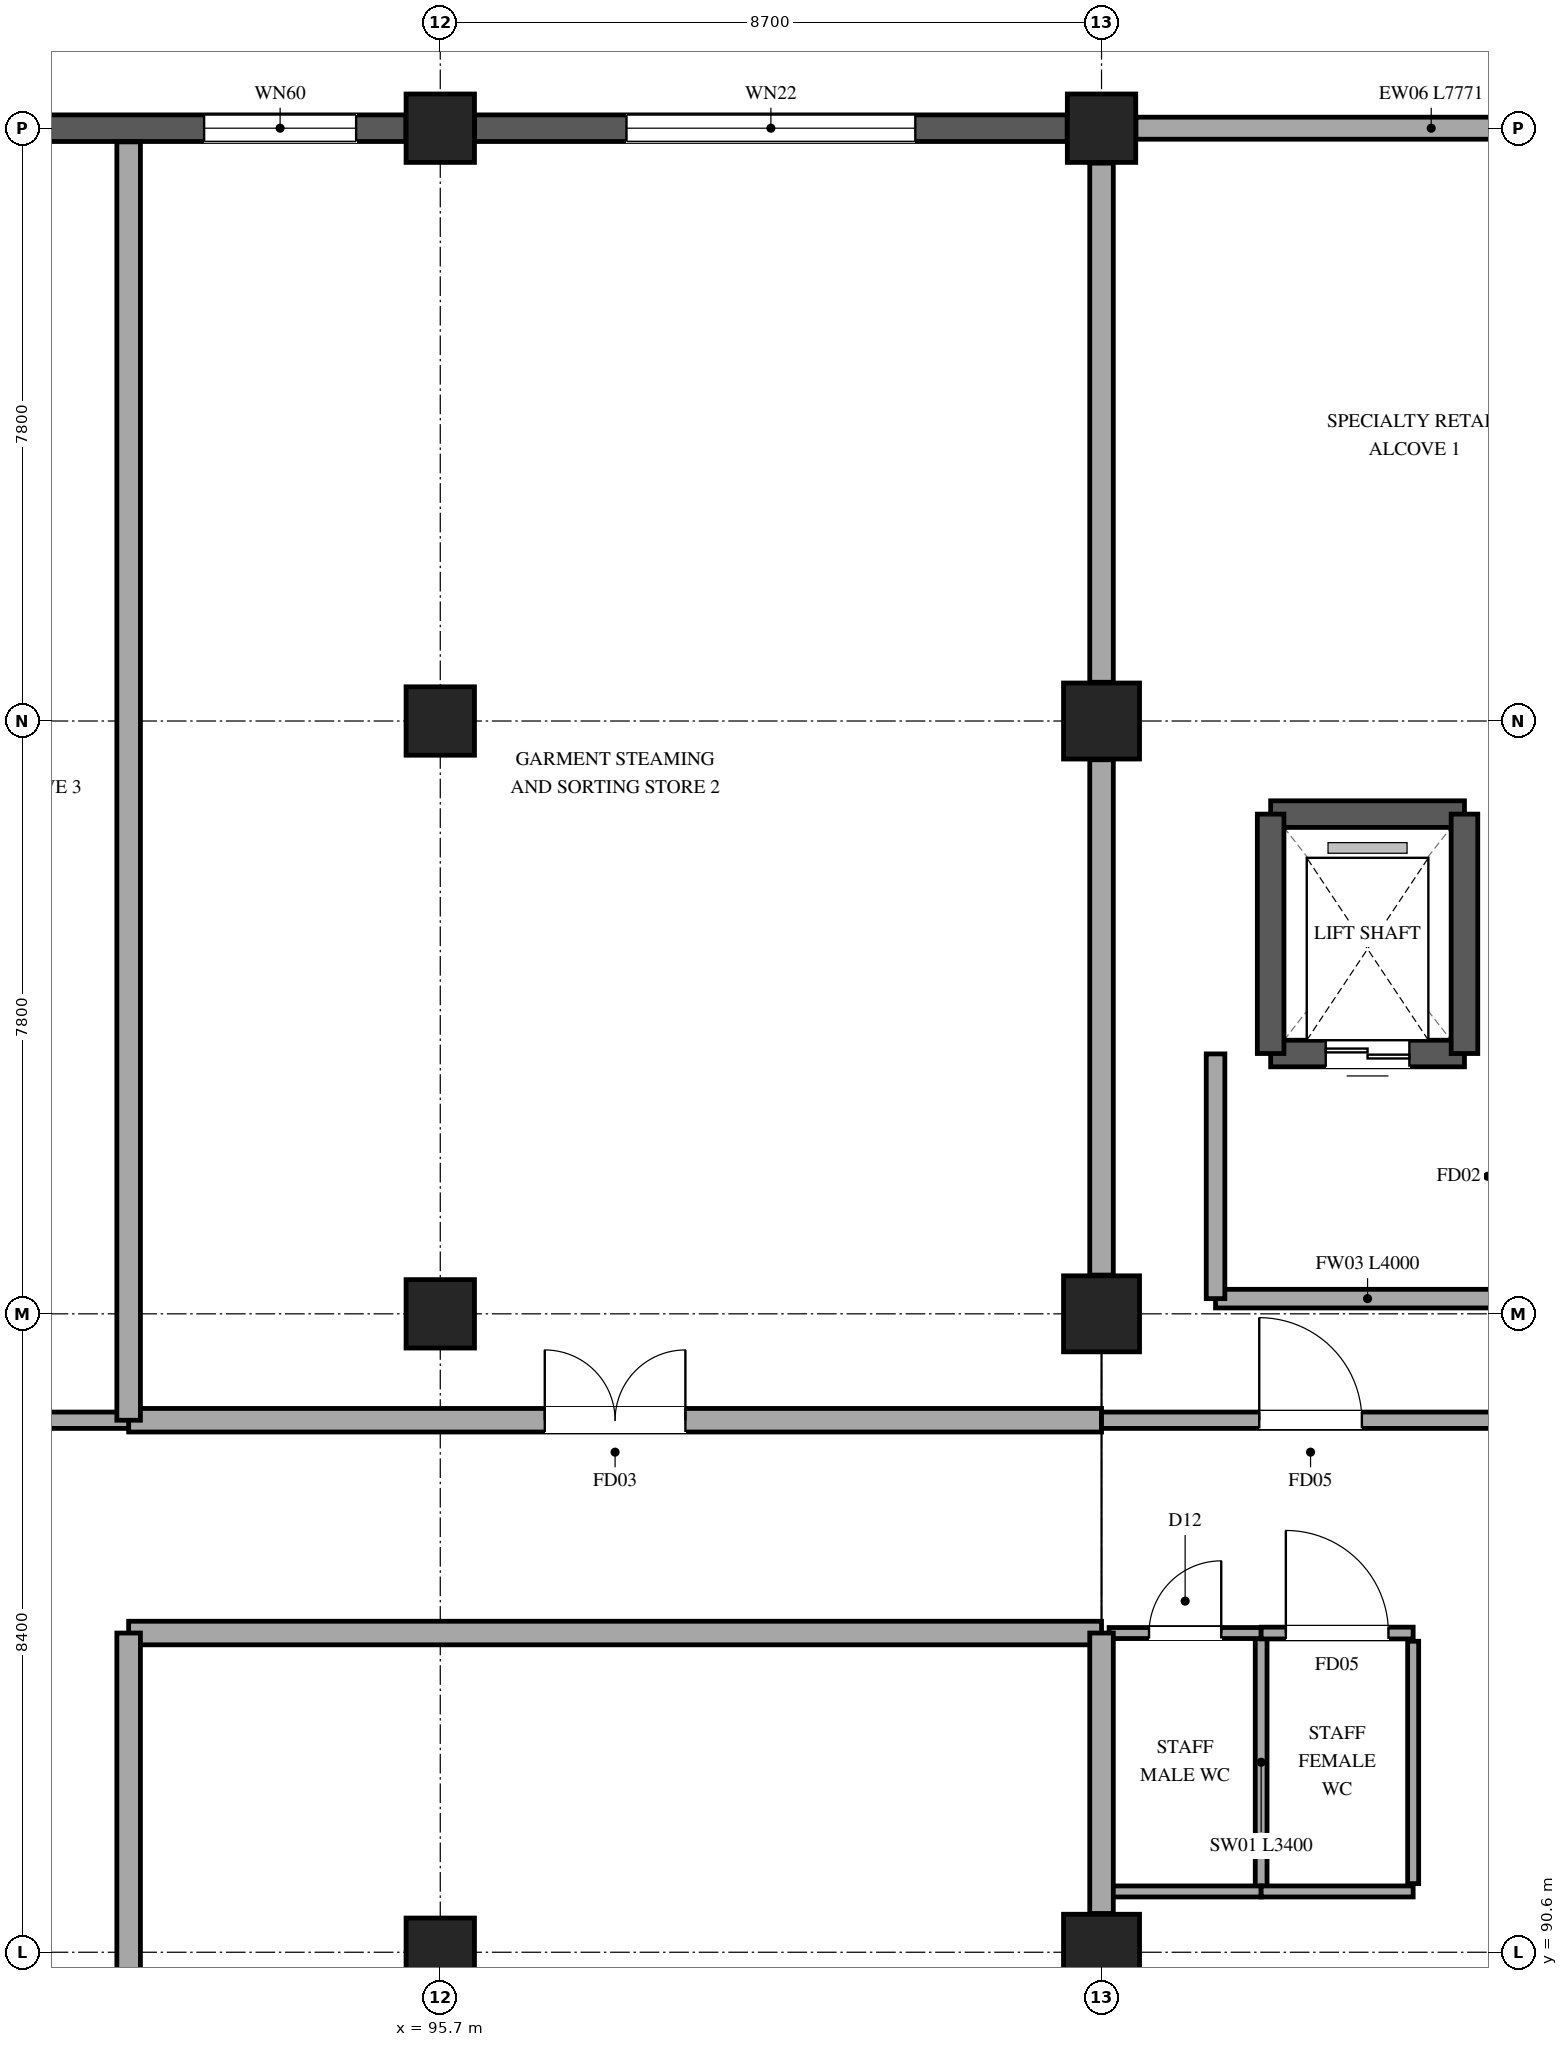
"""IFC4 building model, lengths in metres.
Left out: names, types, materials, properties, quantities, classifications, styles, units other than length and angle.
Written with IfcOpenShell. Run it as: python <this file> out.ifc"""

import sys

from ifc_helpers import new_model, si_unit, direction, frame, frame_2d, origin, origin_2d, place, context, subcontext, project, spatial, rectangle, extrude, element, fill, save


model = new_model("IFC4")
c1 = context("Model", 3, precision=1e-05, world=origin(), true_north=direction((0.0, 1.0)))
c2 = subcontext(c1, "Body", "Model", "MODEL_VIEW")
j1 = project(units=[si_unit("LENGTHUNIT", "METRE"), si_unit("PLANEANGLEUNIT", "RADIAN")], contexts=[c1])
p1 = place(None, origin())
s1 = spatial("IfcSite", under=j1, at=p1, CompositionType="ELEMENT")
p2 = place(p1, origin())
s2 = spatial("IfcBuilding", under=s1, at=p2, CompositionType="ELEMENT")
p3 = place(p2, frame((0.0, 0.0, 6.0)))
s3 = spatial("IfcBuildingStorey", under=s2, at=p3, CompositionType="ELEMENT", Elevation=6.0)
for number, where, z_axis, x_axis in (
    (1, (95.7, 90.6, 0.0), (0.0, 0.0, 1.0), (1.0, 0.0, 0.0)),
    (2, (95.7, 99.0, 0.0), (0.0, 0.0, 1.0), (1.0, 0.0, 0.0)),
    (3, (95.7, 106.8, 0.0), (0.0, 0.0, 1.0), (1.0, 0.0, 0.0)),
    (4, (95.7, 114.6, 0.0), (0.0, 0.0, 1.0), (1.0, 0.0, 0.0)),
):
    element("IfcColumn", number, at=place(p3, frame(where, z_axis=z_axis, x_axis=x_axis)), inside=s3, PredefinedType="COLUMN", context=c2, shape_type="SweptSolid", body=[
        extrude(rectangle(XDim=0.9, YDim=0.9, at=origin_2d()), origin(), (0.0, 0.0, 1.0), 5.4),
    ])
for number, where, z_axis, x_axis in (
    (5, (104.4, 90.6, 0.0), (0.0, 0.0, 1.0), (1.0, 0.0, 0.0)),
    (6, (104.4, 99.0, 0.0), (0.0, 0.0, 1.0), (1.0, 0.0, 0.0)),
    (7, (104.4, 106.8, 0.0), (0.0, 0.0, 1.0), (1.0, 0.0, 0.0)),
):
    element("IfcColumn", number, at=place(p3, frame(where, z_axis=z_axis, x_axis=x_axis)), inside=s3, PredefinedType="COLUMN", context=c2, shape_type="SweptSolid", body=[
        extrude(rectangle(XDim=1.0, YDim=1.0, at=origin_2d()), origin(), (0.0, 0.0, 1.0), 5.4),
    ])
p4 = place(p3, frame((104.4, 114.6, 0.0), z_axis=(0.0, 0.0, 1.0), x_axis=(1.0, 0.0, 0.0)))
e8 = element("IfcColumn", 8, at=p4, inside=s3, PredefinedType="COLUMN", context=c2, shape_type="SweptSolid", body=[
    extrude(rectangle(XDim=0.9, YDim=0.9, at=origin_2d()), origin(), (0.0, 0.0, 1.0), 5.4),
])
p5 = place(p3, frame((87.452, 114.6, 0.0), z_axis=(0.0, 0.0, 1.0), x_axis=(1.0, 0.0, 0.0)))
e9 = element("IfcWall", 9, at=p5, inside=s3, PredefinedType="STANDARD", context=c2, shape_type="SweptSolid", body=[
    extrude(rectangle(XDim=7.796, YDim=0.35, at=frame_2d((3.898, 0.0))), origin(), (0.0, 0.0, 1.0), 5.09),
])
p6 = place(p5, frame((5.141, 0.0, 0.85)))
e10 = element("IfcOpeningElement", 10, at=p6, cuts=e9, PredefinedType="OPENING", context=c2, shape_type="SweptSolid", body=[
    extrude(rectangle(XDim=2.0, YDim=1.85, at=frame_2d((1.0, 0.925))), frame((0.0, 0.185, 0.0), z_axis=(0.0, -1.0, 0.0), x_axis=(1.0, 0.0, 0.0)), (0.0, 0.0, 1.0), 0.37),
])
p7 = place(p3, frame((96.152, 114.6, 0.0), z_axis=(0.0, 0.0, 1.0), x_axis=(1.0, 0.0, 0.0)))
e11 = element("IfcWall", 11, at=p7, inside=s3, PredefinedType="STANDARD", context=c2, shape_type="SweptSolid", body=[
    extrude(rectangle(XDim=7.796, YDim=0.35, at=frame_2d((3.898, 0.0))), origin(), (0.0, 0.0, 1.0), 5.09),
])
p8 = place(p7, frame((1.998, 0.0, 0.85)))
e12 = element("IfcOpeningElement", 12, at=p8, cuts=e11, PredefinedType="OPENING", context=c2, shape_type="SweptSolid", body=[
    extrude(rectangle(XDim=3.8, YDim=2.1, at=frame_2d((1.9, 1.05))), frame((0.0, 0.185, 0.0), z_axis=(0.0, -1.0, 0.0), x_axis=(1.0, 0.0, 0.0)), (0.0, 0.0, 1.0), 0.37),
])
p9 = place(p3, frame((104.852, 114.6, 0.0), z_axis=(0.0, 0.0, 1.0), x_axis=(1.0, 0.0, 0.0)))
e13 = element("IfcWall", 13, at=p9, inside=s3, PredefinedType="STANDARD", context=c2, shape_type="SweptSolid", body=[
    extrude(rectangle(XDim=7.771, YDim=0.29, at=frame_2d((3.885, 0.0))), origin(), (0.0, 0.0, 1.0), 2.025),
])
p10 = place(p3, frame((106.625, 105.575, 0.0), z_axis=(0.0, 0.0, 1.0), x_axis=(1.0, 0.0, 0.0)))
e14 = element("IfcWall", 14, at=p10, inside=s3, PredefinedType="SHEAR", context=c2, shape_type="SweptSolid", body=[
    extrude(rectangle(XDim=2.55, YDim=0.35, at=frame_2d((1.275, 0.0))), origin(), (0.0, 0.0, 1.0), 5.4),
])
p11 = place(p3, frame((109.175, 102.425, 0.0), z_axis=(0.0, 0.0, 1.0), x_axis=(-1.0, 0.0, 0.0)))
e15 = element("IfcWall", 15, at=p11, inside=s3, PredefinedType="SHEAR", context=c2, shape_type="SweptSolid", body=[
    extrude(rectangle(XDim=2.55, YDim=0.35, at=frame_2d((1.275, 0.0))), origin(), (0.0, 0.0, 1.0), 5.4),
])
p12 = place(p11, frame((0.725, 0.0, 0.0)))
e16 = element("IfcOpeningElement", 16, at=p12, cuts=e15, PredefinedType="OPENING", context=c2, shape_type="SweptSolid", body=[
    extrude(rectangle(XDim=1.1, YDim=2.2, at=frame_2d((0.55, 1.1))), frame((0.0, 0.185, 0.0), z_axis=(0.0, -1.0, 0.0), x_axis=(1.0, 0.0, 0.0)), (0.0, 0.0, 1.0), 0.37),
])
for number, where, z_axis, x_axis in (
    (17, (106.625, 102.425, 0.0), (0.0, 0.0, 1.0), (0.0, 1.0, 0.0)),
    (18, (109.175, 105.575, 0.0), (0.0, 0.0, 1.0), (0.0, -1.0, 0.0)),
):
    element("IfcWall", number, at=place(p3, frame(where, z_axis=z_axis, x_axis=x_axis)), inside=s3, PredefinedType="SHEAR", context=c2, shape_type="SweptSolid", body=[
        extrude(rectangle(XDim=3.15, YDim=0.35, at=frame_2d((1.575, 0.0))), origin(), (0.0, 0.0, 1.0), 5.4),
    ])
p13 = place(p3, frame((109.9, 99.2, 0.0), z_axis=(0.0, 0.0, 1.0), x_axis=(-1.0, 0.0, 0.0)))
e19 = element("IfcWall", 19, at=p13, inside=s3, PredefinedType="STANDARD", context=c2, shape_type="SweptSolid", body=[
    extrude(rectangle(XDim=4.0, YDim=0.245, at=frame_2d((2.0, 0.0))), origin(), (0.0, 0.0, 1.0), 4.325),
])
p14 = place(p3, frame((105.9, 99.2, 0.0), z_axis=(0.0, 0.0, 1.0), x_axis=(0.0, 1.0, 0.0)))
e20 = element("IfcWall", 20, at=p14, inside=s3, PredefinedType="STANDARD", context=c2, shape_type="SweptSolid", body=[
    extrude(rectangle(XDim=3.22, YDim=0.245, at=frame_2d((1.61, 0.0))), origin(), (0.0, 0.0, 1.0), 4.325),
])
p15 = place(p3, frame((106.5, 94.8, 0.0), z_axis=(0.0, 0.0, 1.0), x_axis=(0.0, -1.0, 0.0)))
e21 = element("IfcWall", 21, at=p15, inside=s3, PredefinedType="MOVABLE", context=c2, shape_type="SweptSolid", body=[
    extrude(rectangle(XDim=3.4, YDim=0.155, at=frame_2d((1.7, 0.0))), origin(), (0.0, 0.0, 1.0), 5.06),
])
p16 = place(p3, frame((104.5, 94.8, 0.0), z_axis=(0.0, 0.0, 1.0), x_axis=(1.0, 0.0, 0.0)))
e22 = element("IfcWall", 22, at=p16, inside=s3, PredefinedType="PARTITIONING", context=c2, shape_type="SweptSolid", body=[
    extrude(rectangle(XDim=2.0, YDim=0.145, at=frame_2d((1.0, 0.0))), origin(), (0.0, 0.0, 1.0), 4.28),
])
p17 = place(p16, frame((0.525, 0.0, 0.0)))
e23 = element("IfcOpeningElement", 23, at=p17, cuts=e22, PredefinedType="OPENING", context=c2, shape_type="SweptSolid", body=[
    extrude(rectangle(XDim=0.95, YDim=2.15, at=frame_2d((0.475, 1.075))), frame((0.0, 0.083, 0.0), z_axis=(0.0, -1.0, 0.0), x_axis=(1.0, 0.0, 0.0)), (0.0, 0.0, 1.0), 0.165),
])
p18 = place(p3, frame((106.5, 91.4, 0.0), z_axis=(0.0, 0.0, 1.0), x_axis=(-1.0, 0.0, 0.0)))
e24 = element("IfcWall", 24, at=p18, inside=s3, PredefinedType="PARTITIONING", context=c2, shape_type="SweptSolid", body=[
    extrude(rectangle(XDim=2.0, YDim=0.145, at=frame_2d((1.0, 0.0))), origin(), (0.0, 0.0, 1.0), 4.28),
])
p19 = place(p3, frame((106.5, 94.8, 0.0), z_axis=(0.0, 0.0, 1.0), x_axis=(1.0, 0.0, 0.0)))
e25 = element("IfcWall", 25, at=p19, inside=s3, PredefinedType="MOVABLE", context=c2, shape_type="SweptSolid", body=[
    extrude(rectangle(XDim=2.0, YDim=0.155, at=frame_2d((1.0, 0.0))), origin(), (0.0, 0.0, 1.0), 5.06),
])
p20 = place(p19, frame((0.325, 0.0, 0.0)))
e26 = element("IfcOpeningElement", 26, at=p20, cuts=e25, PredefinedType="OPENING", context=c2, shape_type="SweptSolid", body=[
    extrude(rectangle(XDim=1.35, YDim=2.2, at=frame_2d((0.675, 1.1))), frame((0.0, 0.087, 0.0), z_axis=(0.0, -1.0, 0.0), x_axis=(1.0, 0.0, 0.0)), (0.0, 0.0, 1.0), 0.175),
])
p21 = place(p3, frame((108.5, 91.4, 0.0), z_axis=(0.0, 0.0, 1.0), x_axis=(-1.0, 0.0, 0.0)))
e27 = element("IfcWall", 27, at=p21, inside=s3, PredefinedType="PARTITIONING", context=c2, shape_type="SweptSolid", body=[
    extrude(rectangle(XDim=2.0, YDim=0.145, at=frame_2d((1.0, 0.0))), origin(), (0.0, 0.0, 1.0), 5.06),
])
p22 = place(p3, frame((104.4, 94.8, 0.0), z_axis=(0.0, 0.0, 1.0), x_axis=(-1.0, 0.0, 0.0)))
e28 = element("IfcWall", 28, at=p22, inside=s3, PredefinedType="STANDARD", context=c2, shape_type="SweptSolid", body=[
    extrude(rectangle(XDim=12.8, YDim=0.31, at=frame_2d((6.4, 0.0))), origin(), (0.0, 0.0, 1.0), 4.28),
])
p23 = place(p3, frame((91.6, 94.8, 0.0), z_axis=(0.0, 0.0, 1.0), x_axis=(0.0, -1.0, 0.0)))
e29 = element("IfcWall", 29, at=p23, inside=s3, PredefinedType="STANDARD", context=c2, shape_type="SweptSolid", body=[
    extrude(rectangle(XDim=21.0, YDim=0.31, at=frame_2d((10.5, 0.0))), origin(), (0.0, 0.0, 1.0), 4.28),
])
p24 = place(p23, frame((9.575, 0.0, 0.0)))
e30 = element("IfcOpeningElement", 30, at=p24, cuts=e29, PredefinedType="OPENING", context=c2, shape_type="SweptSolid", body=[
    extrude(rectangle(XDim=1.85, YDim=2.3, at=frame_2d((0.925, 1.15))), frame((0.0, 0.165, 0.0), z_axis=(0.0, -1.0, 0.0), x_axis=(1.0, 0.0, 0.0)), (0.0, 0.0, 1.0), 0.33),
])
p25 = place(p3, frame((91.6, 97.6, 0.0), z_axis=(0.0, 0.0, 1.0), x_axis=(1.0, 0.0, 0.0)))
e31 = element("IfcWall", 31, at=p25, inside=s3, PredefinedType="STANDARD", context=c2, shape_type="SweptSolid", body=[
    extrude(rectangle(XDim=12.8, YDim=0.31, at=frame_2d((6.4, 0.0))), origin(), (0.0, 0.0, 1.0), 4.28),
])
p26 = place(p25, frame((5.475, 0.0, 0.0)))
e32 = element("IfcOpeningElement", 32, at=p26, cuts=e31, PredefinedType="OPENING", context=c2, shape_type="SweptSolid", body=[
    extrude(rectangle(XDim=1.85, YDim=2.3, at=frame_2d((0.925, 1.15))), frame((0.0, 0.165, 0.0), z_axis=(0.0, -1.0, 0.0), x_axis=(1.0, 0.0, 0.0)), (0.0, 0.0, 1.0), 0.33),
])
p27 = place(p3, frame((104.4, 97.6, 0.0), z_axis=(0.0, 0.0, 1.0), x_axis=(1.0, 0.0, 0.0)))
e33 = element("IfcWall", 33, at=p27, inside=s3, PredefinedType="PARTITIONING", context=c2, shape_type="SweptSolid", body=[
    extrude(rectangle(XDim=5.5, YDim=0.215, at=frame_2d((2.75, 0.0))), origin(), (0.0, 0.0, 1.0), 4.28),
])
p28 = place(p27, frame((2.075, 0.0, 0.0)))
e34 = element("IfcOpeningElement", 34, at=p28, cuts=e33, PredefinedType="OPENING", context=c2, shape_type="SweptSolid", body=[
    extrude(rectangle(XDim=1.35, YDim=2.2, at=frame_2d((0.675, 1.1))), frame((0.0, 0.118, 0.0), z_axis=(0.0, -1.0, 0.0), x_axis=(1.0, 0.0, 0.0)), (0.0, 0.0, 1.0), 0.235),
])
p29 = place(p3, frame((88.2, 97.6, 0.0), z_axis=(0.0, 0.0, 1.0), x_axis=(1.0, 0.0, 0.0)))
e35 = element("IfcWall", 35, at=p29, inside=s3, PredefinedType="PARTITIONING", context=c2, shape_type="SweptSolid", body=[
    extrude(rectangle(XDim=3.4, YDim=0.215, at=frame_2d((1.7, 0.0))), origin(), (0.0, 0.0, 1.0), 5.06),
])
p30 = place(p29, frame((1.025, 0.0, 0.0)))
e36 = element("IfcOpeningElement", 36, at=p30, cuts=e35, PredefinedType="OPENING", context=c2, shape_type="SweptSolid", body=[
    extrude(rectangle(XDim=1.35, YDim=2.2, at=frame_2d((0.675, 1.1))), frame((0.0, 0.118, 0.0), z_axis=(0.0, -1.0, 0.0), x_axis=(1.0, 0.0, 0.0)), (0.0, 0.0, 1.0), 0.235),
])
p31 = place(p3, frame((104.4, 94.8, 0.0), z_axis=(0.0, 0.0, 1.0), x_axis=(0.0, -1.0, 0.0)))
e37 = element("IfcWall", 37, at=p31, inside=s3, PredefinedType="STANDARD", context=c2, shape_type="SweptSolid", body=[
    extrude(rectangle(XDim=3.69, YDim=0.31, at=frame_2d((1.845, 0.0))), origin(), (0.0, 0.0, 1.0), 4.28),
])
p32 = place(p3, frame((104.4, 114.14, 0.0), z_axis=(0.0, 0.0, 1.0), x_axis=(0.0, -1.0, 0.0)))
e38 = element("IfcWall", 38, at=p32, inside=s3, PredefinedType="STANDARD", context=c2, shape_type="SweptSolid", body=[
    extrude(rectangle(XDim=6.83, YDim=0.31, at=frame_2d((3.415, 0.0))), origin(), (0.0, 0.0, 1.0), 4.28),
])
p33 = place(p3, frame((104.4, 106.29, 0.0), z_axis=(0.0, 0.0, 1.0), x_axis=(0.0, -1.0, 0.0)))
e39 = element("IfcWall", 39, at=p33, inside=s3, PredefinedType="STANDARD", context=c2, shape_type="SweptSolid", body=[
    extrude(rectangle(XDim=6.78, YDim=0.31, at=frame_2d((3.39, 0.0))), origin(), (0.0, 0.0, 1.0), 4.28),
])
p34 = place(p3, frame((91.6, 97.6, 0.0), z_axis=(0.0, 0.0, 1.0), x_axis=(0.0, 1.0, 0.0)))
e40 = element("IfcWall", 40, at=p34, inside=s3, PredefinedType="STANDARD", context=c2, shape_type="SweptSolid", body=[
    extrude(rectangle(XDim=16.82, YDim=0.31, at=frame_2d((8.41, 0.0))), origin(), (0.0, 0.0, 1.0), 4.28),
])
p35 = place(p3, frame((108.5, 94.692, 0.0), z_axis=(0.0, 0.0, 1.0), x_axis=(0.0, -1.0, 0.0)))
e41 = element("IfcWall", 41, at=p35, inside=s3, PredefinedType="PARTITIONING", context=c2, shape_type="SweptSolid", body=[
    extrude(rectangle(XDim=3.189, YDim=0.145, at=frame_2d((1.594, 0.0))), origin(), (0.0, 0.0, 1.0), 5.06),
])
p36 = place(p6, origin())
e42 = element("IfcWindow", 42, at=p36, inside=s3, PartitioningType="TRIPLE_PANEL_VERTICAL", PredefinedType="WINDOW", context=c2, shape_type="SweptSolid", body=[
    extrude(rectangle(XDim=2.0, YDim=1.85, at=frame_2d((1.0, 0.925))), frame((0.0, 0.03, 0.0), z_axis=(0.0, -1.0, 0.0), x_axis=(1.0, 0.0, 0.0)), (0.0, 0.0, 1.0), 0.06),
])
fill(e10, e42)
p37 = place(p8, origin())
e43 = element("IfcWindow", 43, at=p37, inside=s3, PartitioningType="TRIPLE_PANEL_VERTICAL", PredefinedType="WINDOW", context=c2, shape_type="SweptSolid", body=[
    extrude(rectangle(XDim=3.8, YDim=2.1, at=frame_2d((1.9, 1.05))), frame((0.0, 0.03, 0.0), z_axis=(0.0, -1.0, 0.0), x_axis=(1.0, 0.0, 0.0)), (0.0, 0.0, 1.0), 0.06),
])
fill(e12, e43)
p38 = place(p12, origin())
e44 = element("IfcDoor", 44, at=p38, inside=s3, OperationType="DOUBLE_DOOR_SLIDING", PredefinedType="DOOR", context=c2, shape_type="SweptSolid", body=[
    extrude(rectangle(XDim=1.1, YDim=2.2, at=frame_2d((0.55, 1.1))), frame((0.0, 0.025, 0.0), z_axis=(0.0, -1.0, 0.0), x_axis=(1.0, 0.0, 0.0)), (0.0, 0.0, 1.0), 0.05),
])
fill(e16, e44)
p39 = place(p17, origin())
e45 = element("IfcDoor", 45, at=p39, inside=s3, OperationType="SINGLE_SWING_RIGHT", PredefinedType="DOOR", context=c2, shape_type="SweptSolid", body=[
    extrude(rectangle(XDim=0.95, YDim=2.15, at=frame_2d((0.475, 1.075))), frame((0.0, 0.025, 0.0), z_axis=(0.0, -1.0, 0.0), x_axis=(1.0, 0.0, 0.0)), (0.0, 0.0, 1.0), 0.05),
])
fill(e23, e45)
p40 = place(p20, origin())
e46 = element("IfcDoor", 46, at=p40, inside=s3, OperationType="SINGLE_SWING_LEFT", PredefinedType="DOOR", context=c2, shape_type="SweptSolid", body=[
    extrude(rectangle(XDim=1.35, YDim=2.2, at=frame_2d((0.675, 1.1))), frame((0.0, 0.025, 0.0), z_axis=(0.0, -1.0, 0.0), x_axis=(1.0, 0.0, 0.0)), (0.0, 0.0, 1.0), 0.05),
])
fill(e26, e46)
p41 = place(p26, origin())
e47 = element("IfcDoor", 47, at=p41, inside=s3, OperationType="DOUBLE_DOOR_SINGLE_SWING", PredefinedType="DOOR", context=c2, shape_type="SweptSolid", body=[
    extrude(rectangle(XDim=1.85, YDim=2.3, at=frame_2d((0.925, 1.15))), frame((0.0, 0.025, 0.0), z_axis=(0.0, -1.0, 0.0), x_axis=(1.0, 0.0, 0.0)), (0.0, 0.0, 1.0), 0.05),
])
fill(e32, e47)
p42 = place(p28, origin())
e48 = element("IfcDoor", 48, at=p42, inside=s3, OperationType="SINGLE_SWING_LEFT", PredefinedType="DOOR", context=c2, shape_type="SweptSolid", body=[
    extrude(rectangle(XDim=1.35, YDim=2.2, at=frame_2d((0.675, 1.1))), frame((0.0, 0.025, 0.0), z_axis=(0.0, -1.0, 0.0), x_axis=(1.0, 0.0, 0.0)), (0.0, 0.0, 1.0), 0.05),
])
fill(e34, e48)
save(model, sys.argv[1])
